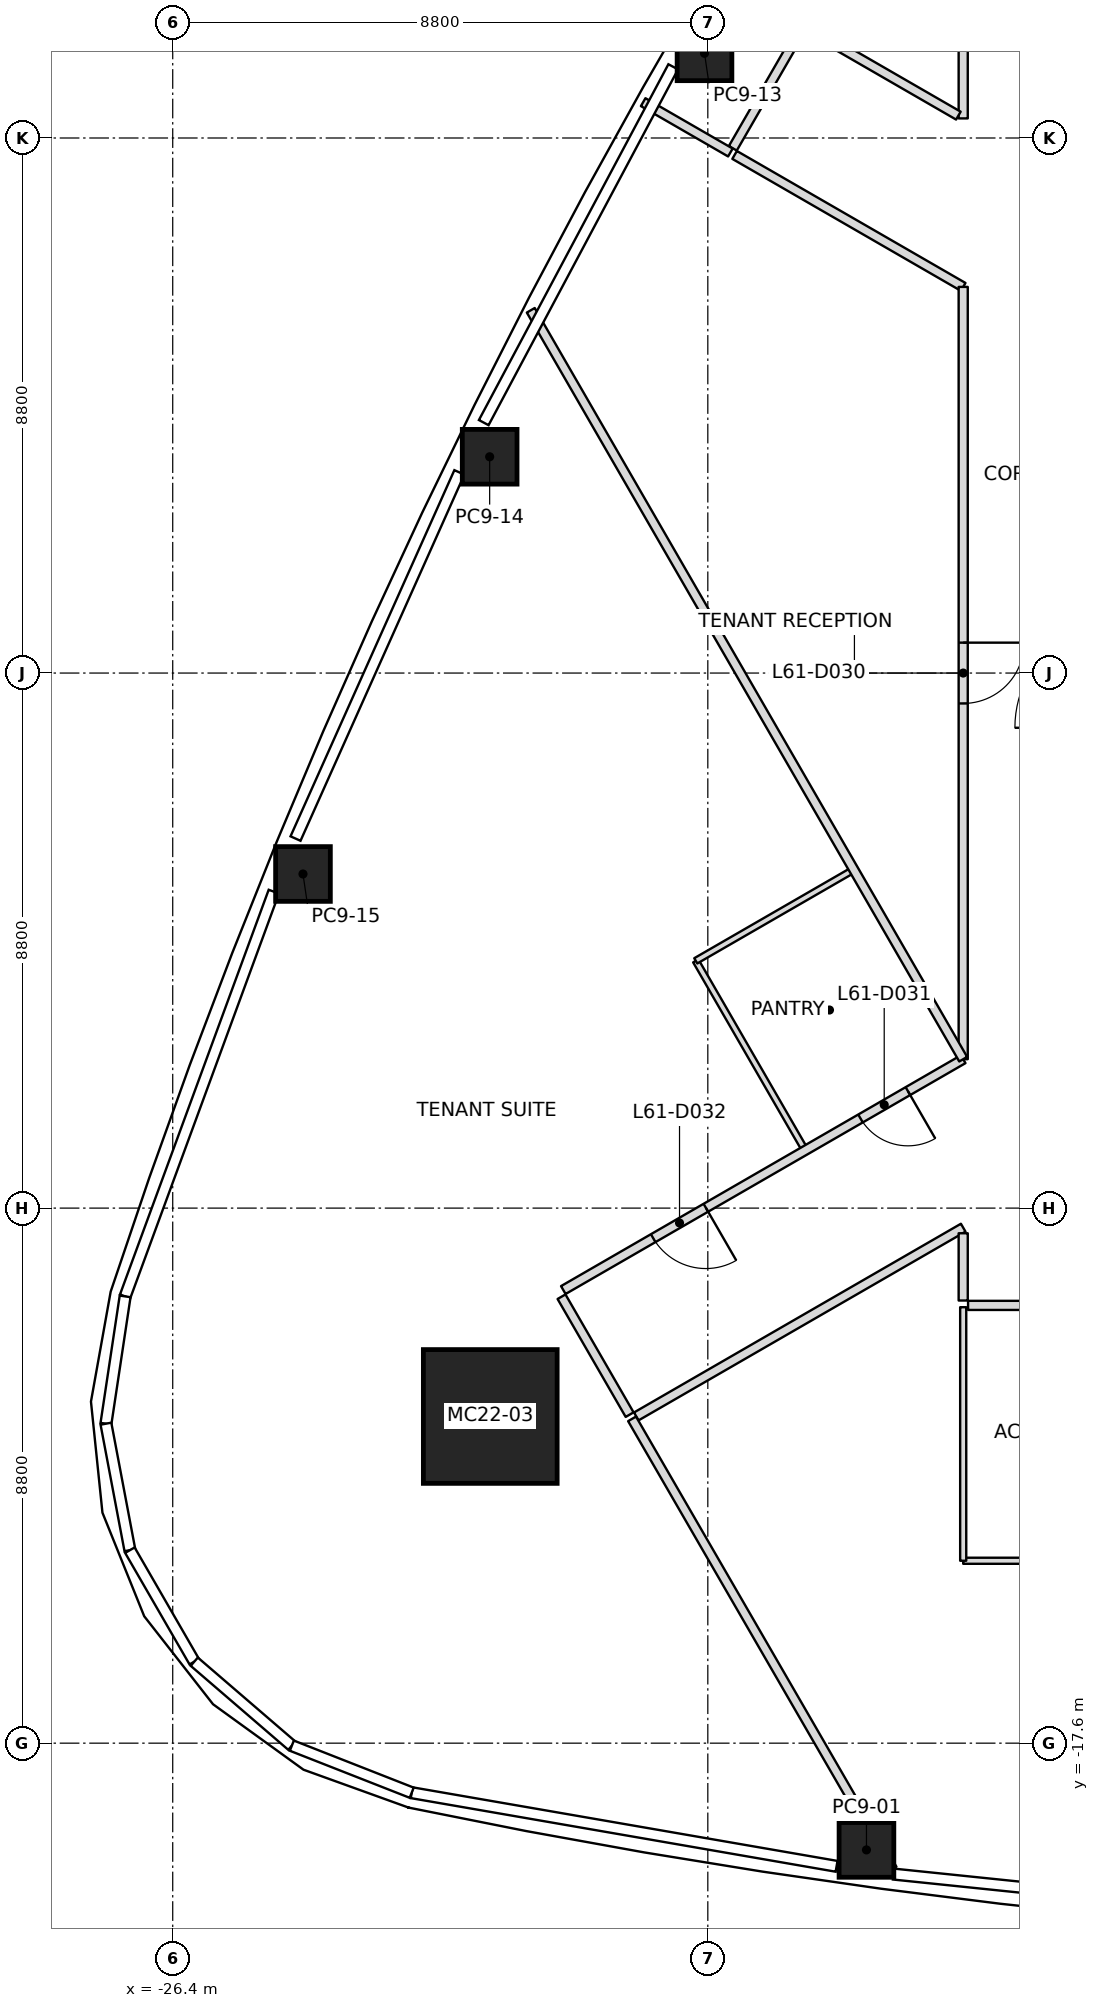
"""IFC4 building model, lengths in metres.
Left out: names, types, materials, properties, quantities, classifications, styles, units other than length and angle.
Written with IfcOpenShell. Run it as: python <this file> out.ifc"""

import sys

from ifc_helpers import new_model, si_unit, direction, frame, frame_2d, origin, origin_2d, place, context, subcontext, project, spatial, rectangle, extrude, element, fill, save


model = new_model("IFC4")
c1 = context("Model", 3, precision=1e-05, world=origin(), true_north=direction((0.0, 1.0)))
c2 = subcontext(c1, "Body", "Model", "MODEL_VIEW")
j1 = project(units=[si_unit("LENGTHUNIT", "METRE"), si_unit("PLANEANGLEUNIT", "RADIAN")], contexts=[c1])
p1 = place(None, origin())
s1 = spatial("IfcSite", under=j1, at=p1, CompositionType="ELEMENT")
p2 = place(p1, origin())
s2 = spatial("IfcBuilding", under=s1, at=p2, CompositionType="ELEMENT")
p3 = place(p2, frame((0.0, 0.0, 271.0)))
s3 = spatial("IfcBuildingStorey", under=s2, at=p3, CompositionType="ELEMENT", Elevation=271.0)
p4 = place(p3, frame((-21.178, -12.227, 0.0), z_axis=(0.027817676907, 0.016043967164, 0.999484250986), x_axis=(0.999613013546, -0.000446478676, -0.027814093645)))
e1 = element("IfcColumn", 1, at=p4, inside=s3, PredefinedType="COLUMN", context=c2, shape_type="SweptSolid", body=[
    extrude(rectangle(XDim=2.2, YDim=2.2, at=origin_2d()), origin(), (0.0, 0.0, 1.0), 4.002),
])
p5 = place(p3, frame((-14.991, -19.356, 0.0), z_axis=(0.017452445502, 0.010434853779, 0.999793241612), x_axis=(-0.990449528145, 0.136960564895, 0.015859882108)))
e2 = element("IfcColumn", 2, at=p5, inside=s3, PredefinedType="COLUMN", context=c2, shape_type="SweptSolid", body=[
    extrude(rectangle(XDim=0.9, YDim=0.9, at=origin_2d()), origin(), (0.0, 0.0, 1.0), 4.001),
])
p6 = place(p3, frame((-17.655, 10.193, 0.0), z_axis=(0.009887049298, -0.00573692984, 0.999934664812), x_axis=(0.499975560967, 0.866039512843, 2.5126546e-05)))
e3 = element("IfcColumn", 3, at=p6, inside=s3, PredefinedType="COLUMN", context=c2, shape_type="SweptSolid", body=[
    extrude(rectangle(XDim=0.9, YDim=0.9, at=origin_2d()), origin(), (0.0, 0.0, 1.0), 4.0),
])
p7 = place(p3, frame((-21.188, 3.557, 0.0), z_axis=(0.014036676147, 0.001952928855, 0.999899573853), x_axis=(0.439409931321, 0.898251713248, -0.007922872255)))
e4 = element("IfcColumn", 4, at=p7, inside=s3, PredefinedType="COLUMN", context=c2, shape_type="SweptSolid", body=[
    extrude(rectangle(XDim=0.9, YDim=0.9, at=origin_2d()), origin(), (0.0, 0.0, 1.0), 4.0),
])
p8 = place(p3, frame((-24.258, -3.305, 0.0), z_axis=(0.017696547774, 0.0099466803, 0.999793926641), x_axis=(0.376779665918, 0.926166726623, -0.015883256809)))
e5 = element("IfcColumn", 5, at=p8, inside=s3, PredefinedType="COLUMN", context=c2, shape_type="SweptSolid", body=[
    extrude(rectangle(XDim=0.9, YDim=0.9, at=origin_2d()), origin(), (0.0, 0.0, 1.0), 4.001),
])
p9 = place(p3, frame((-13.4, -6.351, 0.0), z_axis=(0.0, 0.0, 1.0), x_axis=(-0.500014181681, 0.866017215832, 0.0)))
e6 = element("IfcWall", 6, at=p9, inside=s3, PredefinedType="PARTITIONING", context=c2, shape_type="SweptSolid", body=[
    extrude(rectangle(XDim=14.223, YDim=0.15, at=frame_2d((7.111, 0.0))), origin(), (0.0, 0.0, 1.0), 3.234),
])
p10 = place(p3, frame((-18.846, -12.266, 0.0), z_axis=(0.0, 0.0, 1.0), x_axis=(0.500745947158, -0.865594302433, 0.0)))
e7 = element("IfcWall", 7, at=p10, inside=s3, PredefinedType="PARTITIONING", context=c2, shape_type="SweptSolid", body=[
    extrude(rectangle(XDim=8.553, YDim=0.15, at=frame_2d((4.277, 0.0))), origin(), (0.0, 0.0, 1.0), 3.3),
])
p11 = place(p3, frame((-17.229, 8.561, 0.0), z_axis=(0.0, 0.0, 1.0), x_axis=(-0.866021116422, 0.500007425856, 0.0)))
e8 = element("IfcWall", 8, at=p11, inside=s3, PredefinedType="PARTITIONING", context=c2, shape_type="SweptSolid", body=[
    extrude(rectangle(XDim=1.656, YDim=0.15, at=frame_2d((0.828, 0.0))), origin(), (0.0, 0.0, 1.0), 3.234),
])
p12 = place(p3, frame((-20.006, -10.257, 0.0), z_axis=(0.0, 0.0, 1.0), x_axis=(0.500030632641, -0.866007717299, 0.0)))
e9 = element("IfcWall", 9, at=p12, inside=s3, PredefinedType="PARTITIONING", context=c2, shape_type="SweptSolid", body=[
    extrude(rectangle(XDim=2.24, YDim=0.15, at=frame_2d((1.12, 0.0))), origin(), (0.0, 0.0, 1.0), 3.233),
])
p13 = place(p3, frame((-13.4, -6.351, 0.0), z_axis=(0.0, 0.0, 1.0), x_axis=(-0.866034613097, -0.499984048663, 0.0)))
e10 = element("IfcWall", 10, at=p13, inside=s3, PredefinedType="PARTITIONING", context=c2, shape_type="SweptSolid", body=[
    extrude(rectangle(XDim=7.594, YDim=0.15, at=frame_2d((3.797, 0.0))), origin(), (0.0, 0.0, 1.0), 3.3),
])
p14 = place(p13, frame((1.05, 0.0, 0.0)))
e11 = element("IfcOpeningElement", 11, at=p14, cuts=e10, PredefinedType="OPENING", context=c2, shape_type="SweptSolid", body=[
    extrude(rectangle(XDim=0.9, YDim=2.1, at=frame_2d((0.45, 1.05))), frame((0.0, 0.075, 0.0), z_axis=(0.0, -1.0, 0.0), x_axis=(1.0, 0.0, 0.0)), (0.0, 0.0, 1.0), 0.15),
])
p15 = place(p13, frame((4.887, 0.0, 0.0)))
e12 = element("IfcOpeningElement", 12, at=p15, cuts=e10, PredefinedType="OPENING", context=c2, shape_type="SweptSolid", body=[
    extrude(rectangle(XDim=1.0, YDim=2.1, at=frame_2d((0.5, 1.05))), frame((0.0, 0.075, 0.0), z_axis=(0.0, -1.0, 0.0), x_axis=(1.0, 0.0, 0.0)), (0.0, 0.0, 1.0), 0.15),
])
p16 = place(p3, frame((-18.777, -12.226, 0.0), z_axis=(0.0, 0.0, 1.0), x_axis=(0.866025148001, 0.500000443029, 0.0)))
e13 = element("IfcWall", 13, at=p16, inside=s3, PredefinedType="PARTITIONING", context=c2, shape_type="SweptSolid", body=[
    extrude(rectangle(XDim=6.208, YDim=0.15, at=frame_2d((3.104, 0.0))), origin(), (0.0, 0.0, 1.0), 3.233),
])
p17 = place(p3, frame((-13.4, -9.214, 0.0), z_axis=(0.0, 0.0, 1.0), x_axis=(0.0, -1.0, 0.0)))
e14 = element("IfcWall", 14, at=p17, inside=s3, PredefinedType="PARTITIONING", context=c2, shape_type="SweptSolid", body=[
    extrude(rectangle(XDim=1.106, YDim=0.15, at=frame_2d((0.553, 0.0))), origin(), (0.0, 0.0, 1.0), 3.233),
])
p18 = place(p3, frame((-16.069, 10.571, 0.0), z_axis=(0.0, 0.0, 1.0), x_axis=(-0.49994888933, -0.866054910533, 0.0)))
e15 = element("IfcWall", 15, at=p18, inside=s3, PredefinedType="PARTITIONING", context=c2, shape_type="SweptSolid", body=[
    extrude(rectangle(XDim=2.24, YDim=0.15, at=frame_2d((1.12, 0.0))), origin(), (0.0, 0.0, 1.0), 3.3),
])
p19 = place(p3, frame((-17.159, 8.521, 0.0), z_axis=(0.0, 0.0, 1.0), x_axis=(0.866016071844, -0.500016163047, 0.0)))
e16 = element("IfcWall", 16, at=p19, inside=s3, PredefinedType="PARTITIONING", context=c2, shape_type="SweptSolid", body=[
    extrude(rectangle(XDim=4.341, YDim=0.15, at=frame_2d((2.17, 0.0))), origin(), (0.0, 0.0, 1.0), 3.3),
])
p20 = place(p3, frame((-13.4, 6.351, 0.0), z_axis=(0.0, 0.0, 1.0), x_axis=(0.0, -1.0, 0.0)))
e17 = element("IfcWall", 17, at=p20, inside=s3, PredefinedType="PARTITIONING", context=c2, shape_type="SweptSolid", body=[
    extrude(rectangle(XDim=12.702, YDim=0.15, at=frame_2d((6.351, 0.0))), origin(), (0.0, 0.0, 1.0), 3.3),
])
p21 = place(p20, frame((5.851, 0.0, 0.0)))
e18 = element("IfcOpeningElement", 18, at=p21, cuts=e17, PredefinedType="OPENING", context=c2, shape_type="SweptSolid", body=[
    extrude(rectangle(XDim=1.0, YDim=2.1, at=frame_2d((0.5, 1.05))), frame((0.0, 0.075, 0.0), z_axis=(0.0, -1.0, 0.0), x_axis=(1.0, 0.0, 0.0)), (0.0, 0.0, 1.0), 0.15),
])
p22 = place(p3, frame((-13.4, 10.32, 0.0), z_axis=(0.0, 0.0, 1.0), x_axis=(0.0, -1.0, 0.0)))
e19 = element("IfcWall", 19, at=p22, inside=s3, PredefinedType="PARTITIONING", context=c2, shape_type="SweptSolid", body=[
    extrude(rectangle(XDim=1.198, YDim=0.15, at=frame_2d((0.599, 0.0))), origin(), (0.0, 0.0, 1.0), 3.3),
])
p23 = place(p3, frame((-13.479, 9.168, 0.0), z_axis=(0.0, 0.0, 1.0), x_axis=(-0.866036528751, 0.499980730498, 0.0)))
e20 = element("IfcWall", 20, at=p23, inside=s3, PredefinedType="PARTITIONING", context=c2, shape_type="SweptSolid", body=[
    extrude(rectangle(XDim=2.864, YDim=0.15, at=frame_2d((1.432, 0.0))), origin(), (0.0, 0.0, 1.0), 3.3),
])
p24 = place(p3, frame((-13.32, -10.4, 0.0), z_axis=(0.0, 0.0, 1.0), x_axis=(1.0, 0.0, 0.0)))
e21 = element("IfcWall", 21, at=p24, inside=s3, PredefinedType="PARTITIONING", context=c2, shape_type="SweptSolid", body=[
    extrude(rectangle(XDim=12.12, YDim=0.15, at=frame_2d((6.06, 0.0))), origin(), (0.0, 0.0, 1.0), 3.3),
])
p25 = place(p24, frame((1.27, 0.0, 0.0)))
e22 = element("IfcOpeningElement", 22, at=p25, cuts=e21, PredefinedType="OPENING", context=c2, shape_type="SweptSolid", body=[
    extrude(rectangle(XDim=0.9, YDim=2.1, at=frame_2d((0.45, 1.05))), frame((0.0, 0.075, 0.0), z_axis=(0.0, -1.0, 0.0), x_axis=(1.0, 0.0, 0.0)), (0.0, 0.0, 1.0), 0.15),
])
p26 = place(p24, frame((7.37, 0.0, 0.0)))
e23 = element("IfcOpeningElement", 23, at=p26, cuts=e21, PredefinedType="OPENING", context=c2, shape_type="SweptSolid", body=[
    extrude(rectangle(XDim=1.0, YDim=2.1, at=frame_2d((0.5, 1.05))), frame((0.0, 0.075, 0.0), z_axis=(0.0, -1.0, 0.0), x_axis=(1.0, 0.0, 0.0)), (0.0, 0.0, 1.0), 0.15),
])
p27 = place(p3, frame((-16.013, -7.825, 0.0), z_axis=(0.0, 0.0, 1.0), x_axis=(-0.499971082179, 0.866042098853, 0.0)))
e24 = element("IfcWall", 24, at=p27, inside=s3, PredefinedType="PARTITIONING", context=c2, shape_type="SweptSolid", body=[
    extrude(rectangle(XDim=3.57, YDim=0.1, at=frame_2d((1.785, 0.0))), origin(), (0.0, 0.0, 1.0), 3.3),
])
p28 = place(p3, frame((-17.798, -4.733, 0.0), z_axis=(0.0, 0.0, 1.0), x_axis=(0.866039111053, 0.499976257563, 0.0)))
e25 = element("IfcWall", 25, at=p28, inside=s3, PredefinedType="PARTITIONING", context=c2, shape_type="SweptSolid", body=[
    extrude(rectangle(XDim=2.97, YDim=0.1, at=frame_2d((1.485, 0.0))), origin(), (0.0, 0.0, 1.0), 3.3),
])
p29 = place(p3, frame((-9.8, -14.6, 0.0), z_axis=(0.0, 0.0, 1.0), x_axis=(-1.0, 0.0, 0.0)))
e26 = element("IfcWall", 26, at=p29, inside=s3, PredefinedType="PARTITIONING", context=c2, shape_type="SweptSolid", body=[
    extrude(rectangle(XDim=3.6, YDim=0.1, at=frame_2d((1.8, 0.0))), origin(), (0.0, 0.0, 1.0), 3.3),
])
p30 = place(p3, frame((-13.4, -14.6, 0.0), z_axis=(0.0, 0.0, 1.0), x_axis=(0.0, 1.0, 0.0)))
e27 = element("IfcWall", 27, at=p30, inside=s3, PredefinedType="PARTITIONING", context=c2, shape_type="SweptSolid", body=[
    extrude(rectangle(XDim=4.17, YDim=0.1, at=frame_2d((2.085, 0.0))), origin(), (0.0, 0.0, 1.0), 3.3),
])
p31 = place(p21, origin())
e28 = element("IfcDoor", 28, at=p31, inside=s3, OperationType="SINGLE_SWING_LEFT", PredefinedType="DOOR", context=c2, shape_type="SweptSolid", body=[
    extrude(rectangle(XDim=1.0, YDim=2.1, at=frame_2d((0.5, 1.05))), frame((0.0, 0.025, 0.0), z_axis=(0.0, -1.0, 0.0), x_axis=(1.0, 0.0, 0.0)), (0.0, 0.0, 1.0), 0.05),
])
fill(e18, e28)
p32 = place(p14, origin())
e29 = element("IfcDoor", 29, at=p32, inside=s3, OperationType="SINGLE_SWING_RIGHT", PredefinedType="DOOR", context=c2, shape_type="SweptSolid", body=[
    extrude(rectangle(XDim=0.9, YDim=2.1, at=frame_2d((0.45, 1.05))), frame((0.0, 0.025, 0.0), z_axis=(0.0, -1.0, 0.0), x_axis=(1.0, 0.0, 0.0)), (0.0, 0.0, 1.0), 0.05),
])
fill(e11, e29)
p33 = place(p15, origin())
e30 = element("IfcDoor", 30, at=p33, inside=s3, OperationType="SINGLE_SWING_LEFT", PredefinedType="DOOR", context=c2, shape_type="SweptSolid", body=[
    extrude(rectangle(XDim=1.0, YDim=2.1, at=frame_2d((0.5, 1.05))), frame((0.0, 0.025, 0.0), z_axis=(0.0, -1.0, 0.0), x_axis=(1.0, 0.0, 0.0)), (0.0, 0.0, 1.0), 0.05),
])
fill(e12, e30)
save(model, sys.argv[1])
